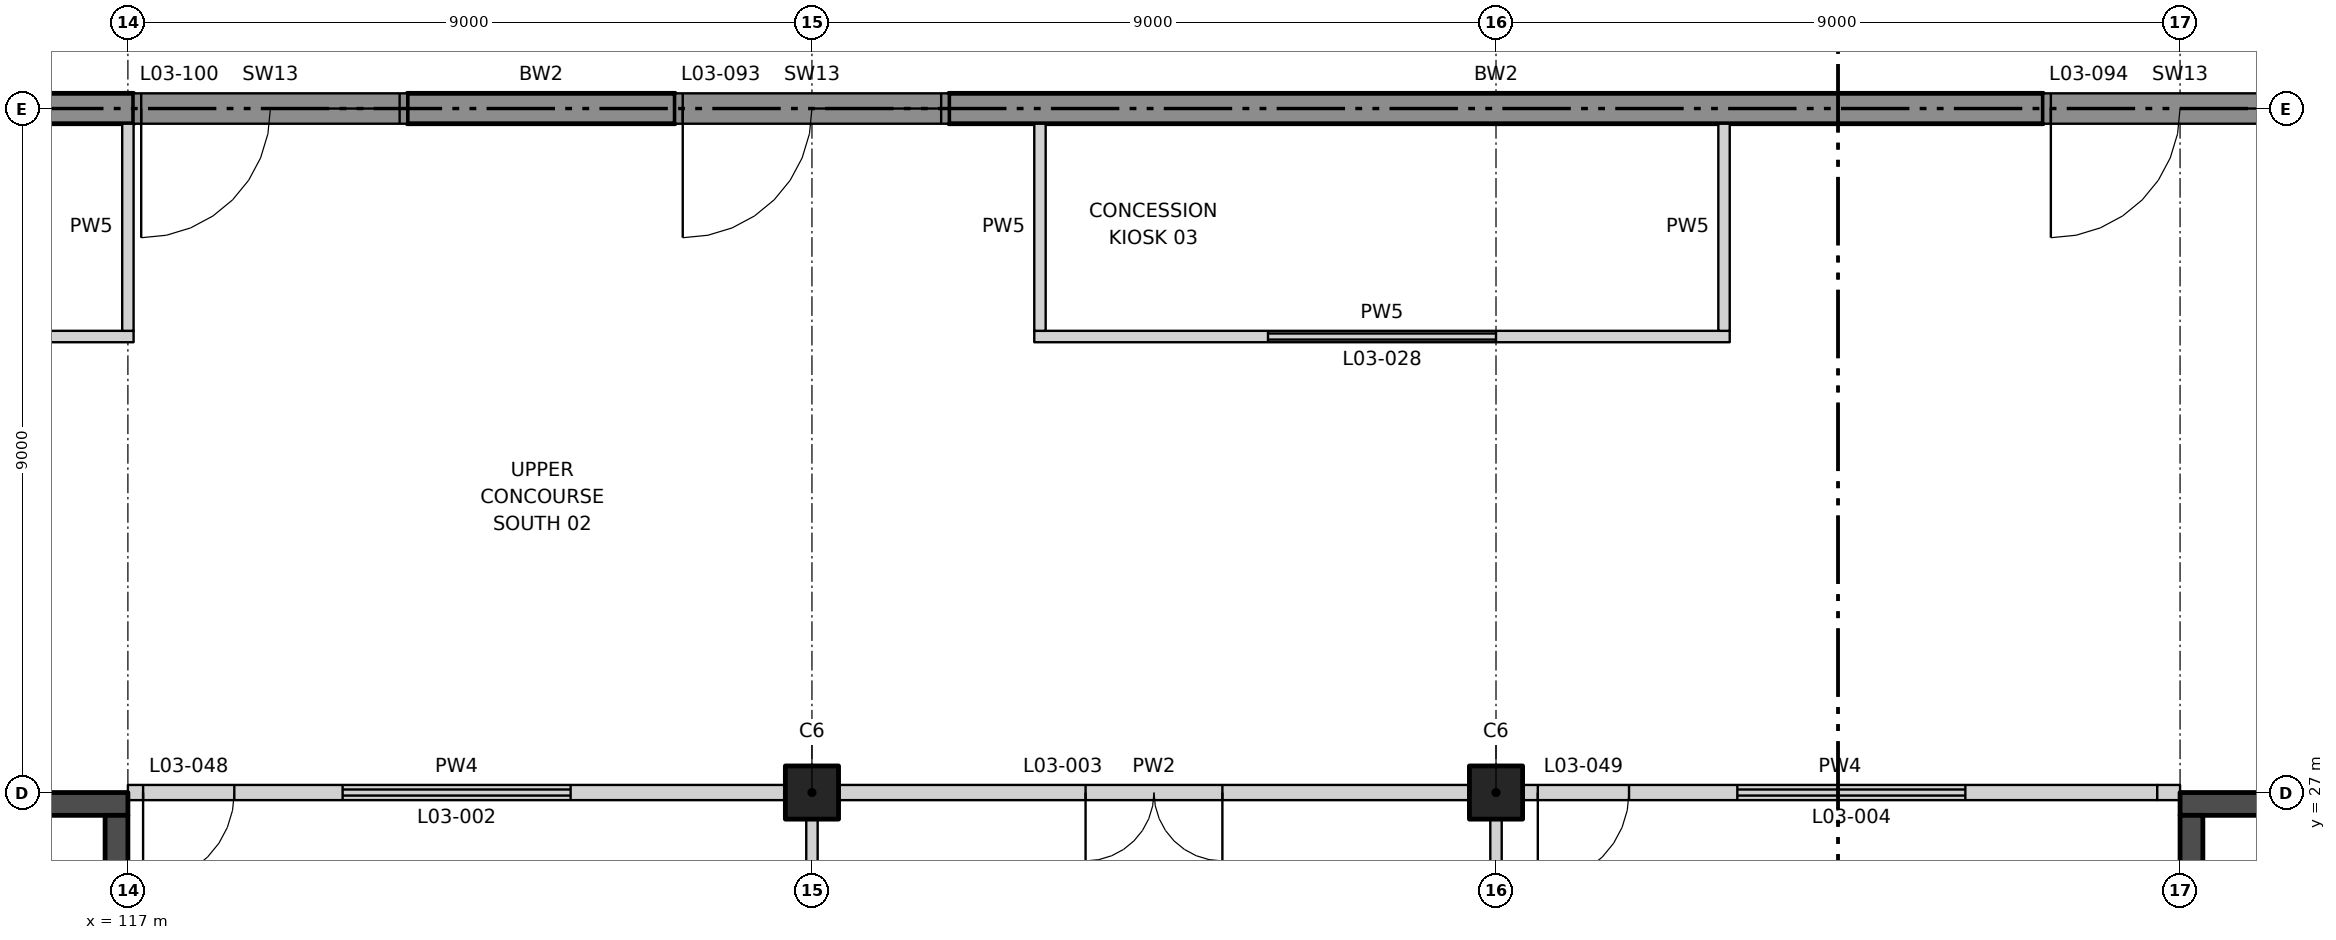
"""IFC4 building model, lengths in metres.
Left out: names, types, materials, properties, quantities, classifications, styles, units other than length and angle.
Written with IfcOpenShell. Run it as: python <this file> out.ifc"""

import sys

from ifc_helpers import new_model, si_unit, direction, frame, frame_2d, origin, origin_2d, place, context, subcontext, project, spatial, rectangle, extrude, element, fill, save


model = new_model("IFC4")
c1 = context("Model", 3, precision=1e-05, world=origin(), true_north=direction((0.0, 1.0)))
c2 = subcontext(c1, "Body", "Model", "MODEL_VIEW")
j1 = project(units=[si_unit("LENGTHUNIT", "METRE"), si_unit("PLANEANGLEUNIT", "RADIAN")], contexts=[c1])
p1 = place(None, origin())
s1 = spatial("IfcSite", under=j1, at=p1, CompositionType="ELEMENT")
p2 = place(p1, origin())
s2 = spatial("IfcBuilding", under=s1, at=p2, CompositionType="ELEMENT")
p3 = place(p2, frame((0.0, 0.0, 22.0)))
s3 = spatial("IfcBuildingStorey", under=s2, at=p3, CompositionType="ELEMENT", Elevation=22.0)
for number, where, z_axis, x_axis in (
    (1, (126.0, 27.0, 0.0), (0.0, 0.0, 1.0), (1.0, 0.0, 0.0)),
    (2, (135.0, 27.0, 0.0), (0.0, 0.0, 1.0), (1.0, 0.0, 0.0)),
):
    element("IfcColumn", number, at=place(p3, frame(where, z_axis=z_axis, x_axis=x_axis)), inside=s3, PredefinedType="COLUMN", context=c2, shape_type="SweptSolid", body=[
        extrude(rectangle(XDim=0.7, YDim=0.7, at=origin_2d()), origin(), (0.0, 0.0, 1.0), 6.0),
    ])
p4 = place(p3, frame((105.3, 36.0, 0.0), z_axis=(0.0, 0.0, 1.0), x_axis=(1.0, 0.0, 0.0)))
e3 = element("IfcWall", 3, at=p4, inside=s3, PredefinedType="SOLIDWALL", context=c2, shape_type="SweptSolid", body=[
    extrude(rectangle(XDim=11.775, YDim=0.4, at=frame_2d((5.887, 0.0))), origin(), (0.0, 0.0, 1.0), 6.0),
])
p5 = place(p3, frame((120.675, 36.0, 0.0), z_axis=(0.0, 0.0, 1.0), x_axis=(1.0, 0.0, 0.0)))
e4 = element("IfcWall", 4, at=p5, inside=s3, PredefinedType="SOLIDWALL", context=c2, shape_type="SweptSolid", body=[
    extrude(rectangle(XDim=3.525, YDim=0.4, at=frame_2d((1.762, 0.0))), origin(), (0.0, 0.0, 1.0), 6.0),
])
p6 = place(p3, frame((127.8, 36.0, 0.0), z_axis=(0.0, 0.0, 1.0), x_axis=(1.0, 0.0, 0.0)))
e5 = element("IfcWall", 5, at=p6, inside=s3, PredefinedType="SOLIDWALL", context=c2, shape_type="SweptSolid", body=[
    extrude(rectangle(XDim=14.4, YDim=0.4, at=frame_2d((7.2, 0.0))), origin(), (0.0, 0.0, 1.0), 6.0),
])
p7 = place(p3, frame((117.0, 27.0, 0.0), z_axis=(0.0, 0.0, 1.0), x_axis=(1.0, 0.0, 0.0)))
e6 = element("IfcWall", 6, at=p7, inside=s3, PredefinedType="PARTITIONING", context=c2, shape_type="SweptSolid", body=[
    extrude(rectangle(XDim=8.65, YDim=0.2, at=frame_2d((4.325, 0.0))), origin(), (0.0, 0.0, 1.0), 4.8),
])
p8 = place(p7, frame((2.825, 0.0, 0.0)))
e7 = element("IfcOpeningElement", 7, at=p8, cuts=e6, PredefinedType="OPENING", context=c2, shape_type="SweptSolid", body=[
    extrude(rectangle(XDim=3.0, YDim=2.4, at=frame_2d((1.5, 1.2))), frame((0.0, 0.11, 0.0), z_axis=(0.0, -1.0, 0.0), x_axis=(1.0, 0.0, 0.0)), (0.0, 0.0, 1.0), 0.22),
])
p9 = place(p7, frame((0.2, 0.0, 0.0)))
e8 = element("IfcOpeningElement", 8, at=p9, cuts=e6, PredefinedType="OPENING", context=c2, shape_type="SweptSolid", body=[
    extrude(rectangle(XDim=1.2, YDim=2.1, at=frame_2d((0.6, 1.05))), frame((0.0, 0.11, 0.0), z_axis=(0.0, -1.0, 0.0), x_axis=(1.0, 0.0, 0.0)), (0.0, 0.0, 1.0), 0.22),
])
p10 = place(p3, frame((126.35, 27.0, 0.0), z_axis=(0.0, 0.0, 1.0), x_axis=(1.0, 0.0, 0.0)))
e9 = element("IfcWall", 9, at=p10, inside=s3, PredefinedType="PARTITIONING", context=c2, shape_type="SweptSolid", body=[
    extrude(rectangle(XDim=8.3, YDim=0.2, at=frame_2d((4.15, 0.0))), origin(), (0.0, 0.0, 1.0), 4.8),
])
p11 = place(p10, frame((3.25, 0.0, 0.0)))
e10 = element("IfcOpeningElement", 10, at=p11, cuts=e9, PredefinedType="OPENING", context=c2, shape_type="SweptSolid", body=[
    extrude(rectangle(XDim=1.8, YDim=2.1, at=frame_2d((0.9, 1.05))), frame((0.0, 0.11, 0.0), z_axis=(0.0, -1.0, 0.0), x_axis=(1.0, 0.0, 0.0)), (0.0, 0.0, 1.0), 0.22),
])
p12 = place(p3, frame((135.35, 27.0, 0.0), z_axis=(0.0, 0.0, 1.0), x_axis=(1.0, 0.0, 0.0)))
e11 = element("IfcWall", 11, at=p12, inside=s3, PredefinedType="PARTITIONING", context=c2, shape_type="SweptSolid", body=[
    extrude(rectangle(XDim=8.35, YDim=0.2, at=frame_2d((4.175, 0.0))), origin(), (0.0, 0.0, 1.0), 4.8),
])
p13 = place(p12, frame((2.825, 0.0, 0.0)))
e12 = element("IfcOpeningElement", 12, at=p13, cuts=e11, PredefinedType="OPENING", context=c2, shape_type="SweptSolid", body=[
    extrude(rectangle(XDim=3.0, YDim=2.4, at=frame_2d((1.5, 1.2))), frame((0.0, 0.11, 0.0), z_axis=(0.0, -1.0, 0.0), x_axis=(1.0, 0.0, 0.0)), (0.0, 0.0, 1.0), 0.22),
])
p14 = place(p12, frame((0.2, 0.0, 0.0)))
e13 = element("IfcOpeningElement", 13, at=p14, cuts=e11, PredefinedType="OPENING", context=c2, shape_type="SweptSolid", body=[
    extrude(rectangle(XDim=1.2, YDim=2.1, at=frame_2d((0.6, 1.05))), frame((0.0, 0.11, 0.0), z_axis=(0.0, -1.0, 0.0), x_axis=(1.0, 0.0, 0.0)), (0.0, 0.0, 1.0), 0.22),
])
p15 = place(p3, frame((107.925, 33.0, 0.0), z_axis=(0.0, 0.0, 1.0), x_axis=(1.0, 0.0, 0.0)))
e14 = element("IfcWall", 14, at=p15, inside=s3, PredefinedType="PARTITIONING", context=c2, shape_type="SweptSolid", body=[
    extrude(rectangle(XDim=9.15, YDim=0.15, at=frame_2d((4.575, 0.0))), origin(), (0.0, 0.0, 1.0), 6.0),
])
p16 = place(p15, frame((3.075, 0.0, 0.0)))
e15 = element("IfcOpeningElement", 15, at=p16, cuts=e14, PredefinedType="OPENING", context=c2, shape_type="SweptSolid", body=[
    extrude(rectangle(XDim=3.0, YDim=2.4, at=frame_2d((1.5, 1.2))), frame((0.0, 0.085, 0.0), z_axis=(0.0, -1.0, 0.0), x_axis=(1.0, 0.0, 0.0)), (0.0, 0.0, 1.0), 0.17),
])
p17 = place(p3, frame((128.925, 33.0, 0.0), z_axis=(0.0, 0.0, 1.0), x_axis=(1.0, 0.0, 0.0)))
e16 = element("IfcWall", 16, at=p17, inside=s3, PredefinedType="PARTITIONING", context=c2, shape_type="SweptSolid", body=[
    extrude(rectangle(XDim=9.15, YDim=0.15, at=frame_2d((4.575, 0.0))), origin(), (0.0, 0.0, 1.0), 6.0),
])
p18 = place(p17, frame((3.075, 0.0, 0.0)))
e17 = element("IfcOpeningElement", 17, at=p18, cuts=e16, PredefinedType="OPENING", context=c2, shape_type="SweptSolid", body=[
    extrude(rectangle(XDim=3.0, YDim=2.4, at=frame_2d((1.5, 1.2))), frame((0.0, 0.085, 0.0), z_axis=(0.0, -1.0, 0.0), x_axis=(1.0, 0.0, 0.0)), (0.0, 0.0, 1.0), 0.17),
])
p19 = place(p3, frame((117.0, 33.075, 0.0), z_axis=(0.0, 0.0, 1.0), x_axis=(0.0, 1.0, 0.0)))
e18 = element("IfcWall", 18, at=p19, inside=s3, PredefinedType="PARTITIONING", context=c2, shape_type="SweptSolid", body=[
    extrude(rectangle(XDim=2.725, YDim=0.15, at=frame_2d((1.363, 0.0))), origin(), (0.0, 0.0, 1.0), 4.7),
])
p20 = place(p3, frame((126.0, 18.4, 0.0), z_axis=(0.0, 0.0, 1.0), x_axis=(0.0, 1.0, 0.0)))
e19 = element("IfcWall", 19, at=p20, inside=s3, PredefinedType="PARTITIONING", context=c2, shape_type="SweptSolid", body=[
    extrude(rectangle(XDim=8.25, YDim=0.15, at=frame_2d((4.125, 0.0))), origin(), (0.0, 0.0, 1.0), 4.8),
])
p21 = place(p3, frame((129.0, 33.075, 0.0), z_axis=(0.0, 0.0, 1.0), x_axis=(0.0, 1.0, 0.0)))
e20 = element("IfcWall", 20, at=p21, inside=s3, PredefinedType="PARTITIONING", context=c2, shape_type="SweptSolid", body=[
    extrude(rectangle(XDim=2.725, YDim=0.15, at=frame_2d((1.363, 0.0))), origin(), (0.0, 0.0, 1.0), 6.0),
])
p22 = place(p3, frame((135.0, 18.4, 0.0), z_axis=(0.0, 0.0, 1.0), x_axis=(0.0, 1.0, 0.0)))
e21 = element("IfcWall", 21, at=p22, inside=s3, PredefinedType="PARTITIONING", context=c2, shape_type="SweptSolid", body=[
    extrude(rectangle(XDim=8.25, YDim=0.15, at=frame_2d((4.125, 0.0))), origin(), (0.0, 0.0, 1.0), 4.8),
])
p23 = place(p3, frame((138.0, 33.075, 0.0), z_axis=(0.0, 0.0, 1.0), x_axis=(0.0, 1.0, 0.0)))
e22 = element("IfcWall", 22, at=p23, inside=s3, PredefinedType="PARTITIONING", context=c2, shape_type="SweptSolid", body=[
    extrude(rectangle(XDim=2.725, YDim=0.15, at=frame_2d((1.363, 0.0))), origin(), (0.0, 0.0, 1.0), 6.0),
])
p24 = place(p3, frame((117.0, 26.85, 0.0), z_axis=(0.0, 0.0, 1.0), x_axis=(-1.0, 0.0, 0.0)))
e23 = element("IfcWall", 23, at=p24, inside=s3, PredefinedType="SHEAR", context=c2, shape_type="SweptSolid", body=[
    extrude(rectangle(XDim=18.0, YDim=0.3, at=frame_2d((9.0, 0.0))), origin(), (0.0, 0.0, 1.0), 6.0),
])
p25 = place(p24, frame((8.6, 0.0, 0.0)))
e24 = element("IfcOpeningElement", 24, at=p25, cuts=e23, PredefinedType="OPENING", context=c2, shape_type="SweptSolid", body=[
    extrude(rectangle(XDim=1.2, YDim=2.1, at=frame_2d((0.6, 1.05))), frame((0.0, 0.16, 0.0), z_axis=(0.0, -1.0, 0.0), x_axis=(1.0, 0.0, 0.0)), (0.0, 0.0, 1.0), 0.32),
])
p26 = place(p3, frame((116.85, 26.7, 0.0), z_axis=(0.0, 0.0, 1.0), x_axis=(0.0, -1.0, 0.0)))
e25 = element("IfcWall", 25, at=p26, inside=s3, PredefinedType="SHEAR", context=c2, shape_type="SweptSolid", body=[
    extrude(rectangle(XDim=8.7, YDim=0.3, at=frame_2d((4.35, 0.0))), origin(), (0.0, 0.0, 1.0), 6.0),
])
p27 = place(p3, frame((144.0, 26.85, 0.0), z_axis=(0.0, 0.0, 1.0), x_axis=(1.0, 0.0, 0.0)))
e26 = element("IfcWall", 26, at=p27, inside=s3, PredefinedType="SHEAR", context=c2, shape_type="SweptSolid", body=[
    extrude(rectangle(XDim=18.0, YDim=0.3, at=frame_2d((9.0, 0.0))), origin(), (0.0, 0.0, 1.0), 6.0),
])
p28 = place(p27, frame((8.6, 0.0, 0.0)))
e27 = element("IfcOpeningElement", 27, at=p28, cuts=e26, PredefinedType="OPENING", context=c2, shape_type="SweptSolid", body=[
    extrude(rectangle(XDim=1.2, YDim=2.1, at=frame_2d((0.6, 1.05))), frame((0.0, 0.16, 0.0), z_axis=(0.0, -1.0, 0.0), x_axis=(1.0, 0.0, 0.0)), (0.0, 0.0, 1.0), 0.32),
])
p29 = place(p3, frame((144.15, 26.7, 0.0), z_axis=(0.0, 0.0, 1.0), x_axis=(0.0, -1.0, 0.0)))
e28 = element("IfcWall", 28, at=p29, inside=s3, PredefinedType="SHEAR", context=c2, shape_type="SweptSolid", body=[
    extrude(rectangle(XDim=8.7, YDim=0.3, at=frame_2d((4.35, 0.0))), origin(), (0.0, 0.0, 1.0), 6.0),
])
p30 = place(p3, frame((124.2, 36.0, 0.0), z_axis=(0.0, 0.0, 1.0), x_axis=(1.0, 0.0, 0.0)))
e29 = element("IfcWall", 29, at=p30, inside=s3, PredefinedType="SOLIDWALL", context=c2, shape_type="SweptSolid", body=[
    extrude(rectangle(XDim=3.6, YDim=0.4, at=frame_2d((1.8, 0.0))), origin(), (0.0, 0.0, 1.0), 3.0),
])
p31 = place(p30, frame((0.1, 0.0, 0.0)))
e30 = element("IfcOpeningElement", 30, at=p31, cuts=e29, PredefinedType="OPENING", context=c2, shape_type="SweptSolid", body=[
    extrude(rectangle(XDim=3.4, YDim=2.4, at=frame_2d((1.7, 1.2))), frame((0.0, 0.21, 0.0), z_axis=(0.0, -1.0, 0.0), x_axis=(1.0, 0.0, 0.0)), (0.0, 0.0, 1.0), 0.42),
])
p32 = place(p3, frame((142.2, 36.0, 0.0), z_axis=(0.0, 0.0, 1.0), x_axis=(1.0, 0.0, 0.0)))
e31 = element("IfcWall", 31, at=p32, inside=s3, PredefinedType="SOLIDWALL", context=c2, shape_type="SweptSolid", body=[
    extrude(rectangle(XDim=3.6, YDim=0.4, at=frame_2d((1.8, 0.0))), origin(), (0.0, 0.0, 1.0), 3.0),
])
p33 = place(p32, frame((0.1, 0.0, 0.0)))
e32 = element("IfcOpeningElement", 32, at=p33, cuts=e31, PredefinedType="OPENING", context=c2, shape_type="SweptSolid", body=[
    extrude(rectangle(XDim=3.4, YDim=2.4, at=frame_2d((1.7, 1.2))), frame((0.0, 0.21, 0.0), z_axis=(0.0, -1.0, 0.0), x_axis=(1.0, 0.0, 0.0)), (0.0, 0.0, 1.0), 0.42),
])
p34 = place(p3, frame((117.075, 36.0, 0.0), z_axis=(0.0, 0.0, 1.0), x_axis=(1.0, 0.0, 0.0)))
e33 = element("IfcWall", 33, at=p34, inside=s3, PredefinedType="SOLIDWALL", context=c2, shape_type="SweptSolid", body=[
    extrude(rectangle(XDim=3.6, YDim=0.4, at=frame_2d((1.8, 0.0))), origin(), (0.0, 0.0, 1.0), 3.0),
])
p35 = place(p34, frame((0.1, 0.0, 0.0)))
e34 = element("IfcOpeningElement", 34, at=p35, cuts=e33, PredefinedType="OPENING", context=c2, shape_type="SweptSolid", body=[
    extrude(rectangle(XDim=3.4, YDim=2.4, at=frame_2d((1.7, 1.2))), frame((0.0, 0.21, 0.0), z_axis=(0.0, -1.0, 0.0), x_axis=(1.0, 0.0, 0.0)), (0.0, 0.0, 1.0), 0.42),
])
p36 = place(p3, frame((143.7, 27.0, 0.0), z_axis=(0.0, 0.0, 1.0), x_axis=(1.0, 0.0, 0.0)))
e35 = element("IfcWall", 35, at=p36, inside=s3, PredefinedType="PARTITIONING", context=c2, shape_type="SweptSolid", body=[
    extrude(rectangle(XDim=0.3, YDim=0.2, at=frame_2d((0.15, 0.0))), origin(), (0.0, 0.0, 1.0), 6.0),
])
p37 = place(p8, origin())
e36 = element("IfcDoor", 36, at=p37, inside=s3, OperationType="ROLLINGUP", PredefinedType="DOOR", context=c2, shape_type="SweptSolid", body=[
    extrude(rectangle(XDim=3.0, YDim=2.4, at=frame_2d((1.5, 1.2))), frame((0.0, 0.025, 0.0), z_axis=(0.0, -1.0, 0.0), x_axis=(1.0, 0.0, 0.0)), (0.0, 0.0, 1.0), 0.05),
])
fill(e7, e36)
p38 = place(p11, frame((1.8, 0.0, 0.0), z_axis=(0.0, 0.0, 1.0), x_axis=(-1.0, 0.0, 0.0)))
e37 = element("IfcDoor", 37, at=p38, inside=s3, OperationType="DOUBLE_DOOR_DOUBLE_SWING", PredefinedType="DOOR", context=c2, shape_type="SweptSolid", body=[
    extrude(rectangle(XDim=1.8, YDim=2.1, at=frame_2d((0.9, 1.05))), frame((0.0, 0.025, 0.0), z_axis=(0.0, -1.0, 0.0), x_axis=(1.0, 0.0, 0.0)), (0.0, 0.0, 1.0), 0.05),
])
fill(e10, e37)
p39 = place(p13, origin())
e38 = element("IfcDoor", 38, at=p39, inside=s3, OperationType="ROLLINGUP", PredefinedType="DOOR", context=c2, shape_type="SweptSolid", body=[
    extrude(rectangle(XDim=3.0, YDim=2.4, at=frame_2d((1.5, 1.2))), frame((0.0, 0.025, 0.0), z_axis=(0.0, -1.0, 0.0), x_axis=(1.0, 0.0, 0.0)), (0.0, 0.0, 1.0), 0.05),
])
fill(e12, e38)
p40 = place(p18, origin())
e39 = element("IfcDoor", 39, at=p40, inside=s3, OperationType="ROLLINGUP", PredefinedType="DOOR", context=c2, shape_type="SweptSolid", body=[
    extrude(rectangle(XDim=3.0, YDim=2.4, at=frame_2d((1.5, 1.2))), frame((0.0, 0.025, 0.0), z_axis=(0.0, -1.0, 0.0), x_axis=(1.0, 0.0, 0.0)), (0.0, 0.0, 1.0), 0.05),
])
fill(e17, e39)
p41 = place(p9, frame((1.2, 0.0, 0.0), z_axis=(0.0, 0.0, 1.0), x_axis=(-1.0, 0.0, 0.0)))
e40 = element("IfcDoor", 40, at=p41, inside=s3, OperationType="SINGLE_SWING_RIGHT", PredefinedType="DOOR", context=c2, shape_type="SweptSolid", body=[
    extrude(rectangle(XDim=1.2, YDim=2.1, at=frame_2d((0.6, 1.05))), frame((0.0, 0.025, 0.0), z_axis=(0.0, -1.0, 0.0), x_axis=(1.0, 0.0, 0.0)), (0.0, 0.0, 1.0), 0.05),
])
fill(e8, e40)
p42 = place(p14, frame((1.2, 0.0, 0.0), z_axis=(0.0, 0.0, 1.0), x_axis=(-1.0, 0.0, 0.0)))
e41 = element("IfcDoor", 41, at=p42, inside=s3, OperationType="SINGLE_SWING_RIGHT", PredefinedType="DOOR", context=c2, shape_type="SweptSolid", body=[
    extrude(rectangle(XDim=1.2, YDim=2.1, at=frame_2d((0.6, 1.05))), frame((0.0, 0.025, 0.0), z_axis=(0.0, -1.0, 0.0), x_axis=(1.0, 0.0, 0.0)), (0.0, 0.0, 1.0), 0.05),
])
fill(e13, e41)
p43 = place(p31, frame((3.4, 0.0, 0.0), z_axis=(0.0, 0.0, 1.0), x_axis=(-1.0, 0.0, 0.0)))
e42 = element("IfcDoor", 42, at=p43, inside=s3, OperationType="DOUBLE_DOOR_SINGLE_SWING", PredefinedType="DOOR", context=c2, shape_type="SweptSolid", body=[
    extrude(rectangle(XDim=3.4, YDim=2.4, at=frame_2d((1.7, 1.2))), frame((0.0, 0.025, 0.0), z_axis=(0.0, -1.0, 0.0), x_axis=(1.0, 0.0, 0.0)), (0.0, 0.0, 1.0), 0.05),
])
fill(e30, e42)
p44 = place(p33, frame((3.4, 0.0, 0.0), z_axis=(0.0, 0.0, 1.0), x_axis=(-1.0, 0.0, 0.0)))
e43 = element("IfcDoor", 43, at=p44, inside=s3, OperationType="DOUBLE_DOOR_SINGLE_SWING", PredefinedType="DOOR", context=c2, shape_type="SweptSolid", body=[
    extrude(rectangle(XDim=3.4, YDim=2.4, at=frame_2d((1.7, 1.2))), frame((0.0, 0.025, 0.0), z_axis=(0.0, -1.0, 0.0), x_axis=(1.0, 0.0, 0.0)), (0.0, 0.0, 1.0), 0.05),
])
fill(e32, e43)
p45 = place(p35, frame((3.4, 0.0, 0.0), z_axis=(0.0, 0.0, 1.0), x_axis=(-1.0, 0.0, 0.0)))
e44 = element("IfcDoor", 44, at=p45, inside=s3, OperationType="DOUBLE_DOOR_SINGLE_SWING", PredefinedType="DOOR", context=c2, shape_type="SweptSolid", body=[
    extrude(rectangle(XDim=3.4, YDim=2.4, at=frame_2d((1.7, 1.2))), frame((0.0, 0.025, 0.0), z_axis=(0.0, -1.0, 0.0), x_axis=(1.0, 0.0, 0.0)), (0.0, 0.0, 1.0), 0.05),
])
fill(e34, e44)
save(model, sys.argv[1])
